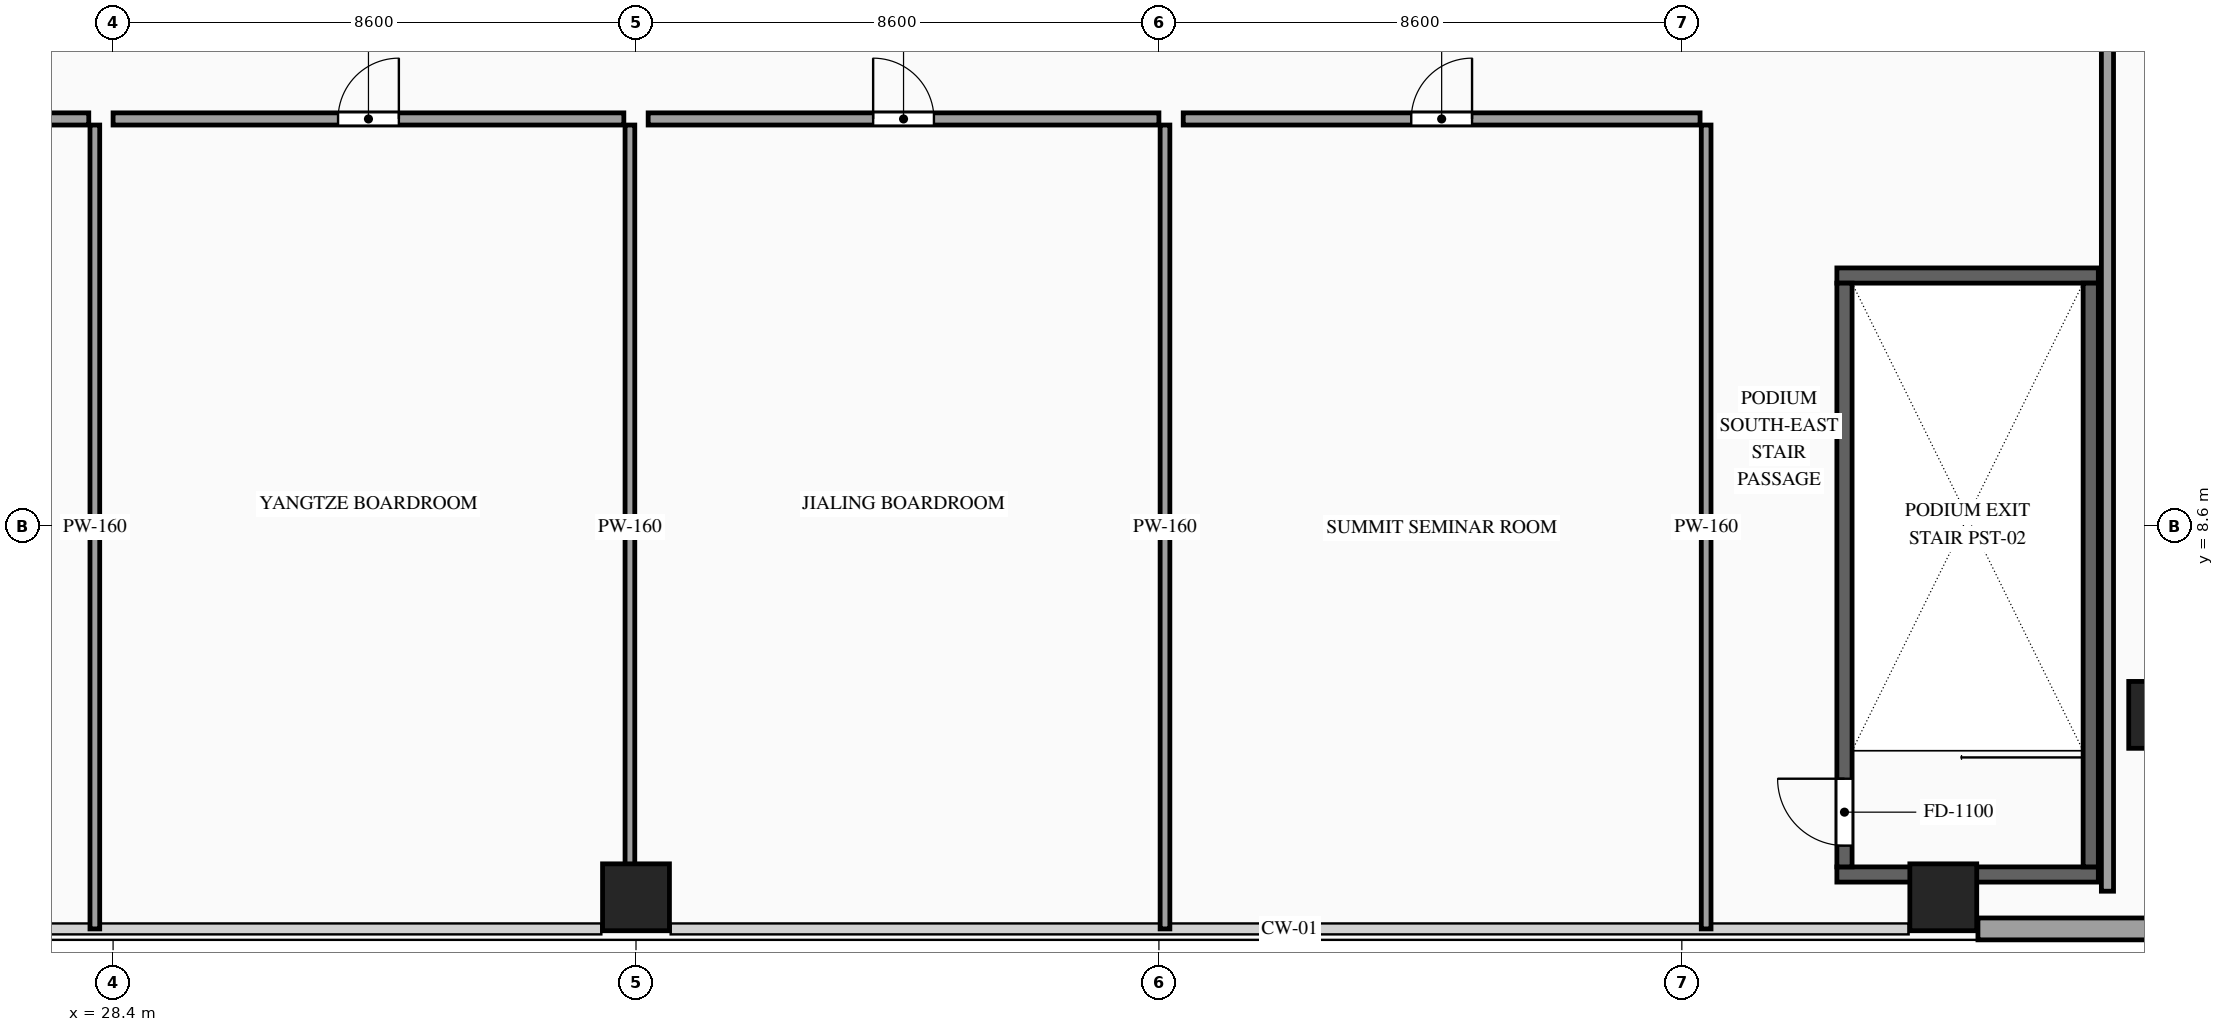
"""IFC4 building model, lengths in metres.
Left out: names, types, materials, properties, quantities, classifications, styles, units other than length and angle.
Written with IfcOpenShell. Run it as: python <this file> out.ifc"""

import sys

from ifc_helpers import new_model, si_unit, direction, frame, frame_2d, origin, origin_2d, place, context, subcontext, project, spatial, rectangle, extrude, source, transform, mapped, element, fill, save


model = new_model("IFC4")
c1 = context("Model", 3, precision=1e-05, world=origin(), true_north=direction((0.0, 1.0)))
c2 = subcontext(c1, "Body", "Model", "MODEL_VIEW")
j1 = project(units=[si_unit("LENGTHUNIT", "METRE"), si_unit("PLANEANGLEUNIT", "RADIAN")], contexts=[c1])
p1 = place(None, origin())
s1 = spatial("IfcSite", under=j1, at=p1, CompositionType="ELEMENT")
p2 = place(p1, origin())
s2 = spatial("IfcBuilding", under=s1, at=p2, CompositionType="ELEMENT")
p3 = place(p2, frame((0.0, 0.0, 25.8)))
s3 = spatial("IfcBuildingStorey", under=s2, at=p3, CompositionType="ELEMENT", Elevation=25.8)
m1 = source(origin(), c2, "Body", "SweptSolid", [
    extrude(rectangle(XDim=1.1, YDim=1.1, at=origin_2d()), origin(), (0.0, 0.0, 1.0), 4.8),
])
for number, where, z_axis, x_axis in (
    (1, (62.1, 5.5, 0.0), (0.0, 0.0, 1.0), (1.0, 0.0, 0.0)),
    (2, (37.0, 2.5, 0.0), (0.0, 0.0, 1.0), (1.0, 0.0, 0.0)),
    (3, (58.5, 2.5, 0.0), (0.0, 0.0, 1.0), (1.0, 0.0, 0.0)),
):
    element("IfcColumn", number, at=place(p3, frame(where, z_axis=z_axis, x_axis=x_axis)), inside=s3, PredefinedType="COLUMN", context=c2, shape_type="MappedRepresentation", body=[
        mapped(m1, transform((0.0, 0.0, 0.0), scale=1.0)),
    ])
p4 = place(p3, frame((59.07, 1.98, 0.0), z_axis=(0.0, 0.0, 1.0), x_axis=(1.0, 0.0, 0.0)))
e4 = element("IfcWall", 4, at=p4, inside=s3, PredefinedType="SOLIDWALL", context=c2, shape_type="SweptSolid", body=[
    extrude(rectangle(XDim=12.93, YDim=0.36, at=frame_2d((6.465, 0.0))), origin(), (0.0, 0.0, 1.0), 4.5),
])
p5 = place(p4, frame((5.73, 0.0, 0.85)))
e5 = element("IfcOpeningElement", 5, at=p5, cuts=e4, PredefinedType="OPENING", context=c2, shape_type="SweptSolid", body=[
    extrude(rectangle(XDim=2.4, YDim=2.4, at=frame_2d((1.2, 1.2))), frame((0.0, 0.195, 0.0), z_axis=(0.0, -1.0, 0.0), x_axis=(1.0, 0.0, 0.0)), (0.0, 0.0, 1.0), 0.39),
])
m2 = source(origin(), c2, "Body", "SweptSolid", [
    extrude(rectangle(XDim=4.3, YDim=0.25, at=frame_2d((2.15, 0.0))), origin(), (0.0, 0.0, 1.0), 4.5),
])
for number, where, z_axis, x_axis in (
    (6, (56.75, 2.875, 0.0), (0.0, 0.0, 1.0), (1.0, 0.0, 0.0)),
    (7, (56.75, 12.725, 0.0), (0.0, 0.0, 1.0), (1.0, 0.0, 0.0)),
):
    element("IfcWall", number, at=place(p3, frame(where, z_axis=z_axis, x_axis=x_axis)), inside=s3, PredefinedType="SOLIDWALL", context=c2, shape_type="MappedRepresentation", body=[
        mapped(m2, transform((0.0, 0.0, 0.0), scale=1.0)),
    ])
p6 = place(p3, frame((56.875, 3.0, 0.0), z_axis=(0.0, 0.0, 1.0), x_axis=(0.0, 1.0, 0.0)))
e8 = element("IfcWall", 8, at=p6, inside=s3, PredefinedType="SOLIDWALL", context=c2, shape_type="SweptSolid", body=[
    extrude(rectangle(XDim=9.6, YDim=0.25, at=frame_2d((4.8, 0.0))), origin(), (0.0, 0.0, 1.0), 4.5),
])
p7 = place(p6, frame((0.35, 0.0, 0.0)))
e9 = element("IfcOpeningElement", 9, at=p7, cuts=e8, PredefinedType="OPENING", context=c2, shape_type="SweptSolid", body=[
    extrude(rectangle(XDim=1.1, YDim=2.2, at=frame_2d((0.55, 1.1))), frame((0.0, 0.14, 0.0), z_axis=(0.0, -1.0, 0.0), x_axis=(1.0, 0.0, 0.0)), (0.0, 0.0, 1.0), 0.28),
])
m3 = source(origin(), c2, "Body", "SweptSolid", [
    extrude(rectangle(XDim=9.6, YDim=0.25, at=frame_2d((4.8, 0.0))), origin(), (0.0, 0.0, 1.0), 4.5),
])
p8 = place(p3, frame((60.925, 3.0, 0.0), z_axis=(0.0, 0.0, 1.0), x_axis=(0.0, 1.0, 0.0)))
e10 = element("IfcWall", 10, at=p8, inside=s3, PredefinedType="SOLIDWALL", context=c2, shape_type="MappedRepresentation", body=[
    mapped(m3, transform((0.0, 0.0, 0.0), scale=1.0)),
])
p9 = place(p3, frame((19.5, 15.3, 0.0), z_axis=(0.0, 0.0, 1.0), x_axis=(1.0, 0.0, 0.0)))
e11 = element("IfcWall", 11, at=p9, inside=s3, PredefinedType="PARTITIONING", context=c2, shape_type="SweptSolid", body=[
    extrude(rectangle(XDim=8.5, YDim=0.2, at=frame_2d((4.25, 0.0))), origin(), (0.0, 0.0, 1.0), 4.5),
])
p10 = place(p9, frame((3.75, 0.0, 0.0)))
e12 = element("IfcOpeningElement", 12, at=p10, cuts=e11, PredefinedType="OPENING", context=c2, shape_type="SweptSolid", body=[
    extrude(rectangle(XDim=1.0, YDim=2.2, at=frame_2d((0.5, 1.1))), frame((0.0, 0.115, 0.0), z_axis=(0.0, -1.0, 0.0), x_axis=(1.0, 0.0, 0.0)), (0.0, 0.0, 1.0), 0.23),
])
m4 = source(origin(), c2, "Body", "SweptSolid", [
    extrude(rectangle(XDim=13.22, YDim=0.16, at=frame_2d((6.61, 0.0))), origin(), (0.0, 0.0, 1.0), 4.5),
])
p11 = place(p3, frame((28.1, 1.98, 0.0), z_axis=(0.0, 0.0, 1.0), x_axis=(0.0, 1.0, 0.0)))
e13 = element("IfcWall", 13, at=p11, inside=s3, PredefinedType="PARTITIONING", context=c2, shape_type="MappedRepresentation", body=[
    mapped(m4, transform((0.0, 0.0, 0.0), scale=1.0)),
])
p12 = place(p3, frame((28.4, 15.3, 0.0), z_axis=(0.0, 0.0, 1.0), x_axis=(1.0, 0.0, 0.0)))
e14 = element("IfcWall", 14, at=p12, inside=s3, PredefinedType="PARTITIONING", context=c2, shape_type="SweptSolid", body=[
    extrude(rectangle(XDim=8.4, YDim=0.2, at=frame_2d((4.2, 0.0))), origin(), (0.0, 0.0, 1.0), 4.5),
])
p13 = place(p12, frame((3.7, 0.0, 0.0)))
e15 = element("IfcOpeningElement", 15, at=p13, cuts=e14, PredefinedType="OPENING", context=c2, shape_type="SweptSolid", body=[
    extrude(rectangle(XDim=1.0, YDim=2.2, at=frame_2d((0.5, 1.1))), frame((0.0, 0.115, 0.0), z_axis=(0.0, -1.0, 0.0), x_axis=(1.0, 0.0, 0.0)), (0.0, 0.0, 1.0), 0.23),
])
m5 = source(origin(), c2, "Body", "SweptSolid", [
    extrude(rectangle(XDim=13.22, YDim=0.16, at=frame_2d((6.61, 0.0))), origin(), (0.0, 0.0, 1.0), 3.095),
])
p14 = place(p3, frame((36.9, 1.98, 0.0), z_axis=(0.0, 0.0, 1.0), x_axis=(0.0, 1.0, 0.0)))
e16 = element("IfcWall", 16, at=p14, inside=s3, PredefinedType="PARTITIONING", context=c2, shape_type="MappedRepresentation", body=[
    mapped(m5, transform((0.0, 0.0, 0.0), scale=1.0)),
])
p15 = place(p3, frame((37.2, 15.3, 0.0), z_axis=(0.0, 0.0, 1.0), x_axis=(1.0, 0.0, 0.0)))
e17 = element("IfcWall", 17, at=p15, inside=s3, PredefinedType="PARTITIONING", context=c2, shape_type="SweptSolid", body=[
    extrude(rectangle(XDim=8.4, YDim=0.2, at=frame_2d((4.2, 0.0))), origin(), (0.0, 0.0, 1.0), 4.5),
])
p16 = place(p15, frame((3.7, 0.0, 0.0)))
e18 = element("IfcOpeningElement", 18, at=p16, cuts=e17, PredefinedType="OPENING", context=c2, shape_type="SweptSolid", body=[
    extrude(rectangle(XDim=1.0, YDim=2.2, at=frame_2d((0.5, 1.1))), frame((0.0, 0.115, 0.0), z_axis=(0.0, -1.0, 0.0), x_axis=(1.0, 0.0, 0.0)), (0.0, 0.0, 1.0), 0.23),
])
p17 = place(p3, frame((45.7, 1.98, 0.0), z_axis=(0.0, 0.0, 1.0), x_axis=(0.0, 1.0, 0.0)))
e19 = element("IfcWall", 19, at=p17, inside=s3, PredefinedType="PARTITIONING", context=c2, shape_type="MappedRepresentation", body=[
    mapped(m4, transform((0.0, 0.0, 0.0), scale=1.0)),
])
p18 = place(p3, frame((46.0, 15.3, 0.0), z_axis=(0.0, 0.0, 1.0), x_axis=(1.0, 0.0, 0.0)))
e20 = element("IfcWall", 20, at=p18, inside=s3, PredefinedType="PARTITIONING", context=c2, shape_type="SweptSolid", body=[
    extrude(rectangle(XDim=8.5, YDim=0.2, at=frame_2d((4.25, 0.0))), origin(), (0.0, 0.0, 1.0), 4.5),
])
p19 = place(p18, frame((3.75, 0.0, 0.0)))
e21 = element("IfcOpeningElement", 21, at=p19, cuts=e20, PredefinedType="OPENING", context=c2, shape_type="SweptSolid", body=[
    extrude(rectangle(XDim=1.0, YDim=2.2, at=frame_2d((0.5, 1.1))), frame((0.0, 0.115, 0.0), z_axis=(0.0, -1.0, 0.0), x_axis=(1.0, 0.0, 0.0)), (0.0, 0.0, 1.0), 0.23),
])
p20 = place(p3, frame((54.6, 1.98, 0.0), z_axis=(0.0, 0.0, 1.0), x_axis=(0.0, 1.0, 0.0)))
e22 = element("IfcWall", 22, at=p20, inside=s3, PredefinedType="PARTITIONING", context=c2, shape_type="MappedRepresentation", body=[
    mapped(m4, transform((0.0, 0.0, 0.0), scale=1.0)),
])
p21 = place(p3, frame((61.2, 2.6, 0.0), z_axis=(0.0, 0.0, 1.0), x_axis=(0.0, 1.0, 0.0)))
e23 = element("IfcWall", 23, at=p21, inside=s3, PredefinedType="PARTITIONING", context=c2, shape_type="SweptSolid", body=[
    extrude(rectangle(XDim=21.8, YDim=0.2, at=frame_2d((10.9, 0.0))), origin(), (0.0, 0.0, 1.0), 4.5),
])
p22 = place(p21, frame((14.9, 0.0, 0.0)))
e24 = element("IfcOpeningElement", 24, at=p22, cuts=e23, PredefinedType="OPENING", context=c2, shape_type="SweptSolid", body=[
    extrude(rectangle(XDim=1.0, YDim=2.2, at=frame_2d((0.5, 1.1))), frame((0.0, 0.115, 0.0), z_axis=(0.0, -1.0, 0.0), x_axis=(1.0, 0.0, 0.0)), (0.0, 0.0, 1.0), 0.23),
])
m6 = source(origin(), c2, "Body", "SweptSolid", [
    extrude(rectangle(XDim=1.1, YDim=2.2, at=frame_2d((0.55, 1.1))), frame((0.0, 0.025, 0.0), z_axis=(0.0, -1.0, 0.0), x_axis=(1.0, 0.0, 0.0)), (0.0, 0.0, 1.0), 0.05),
])
p23 = place(p7, origin())
e25 = element("IfcDoor", 25, at=p23, inside=s3, OperationType="SINGLE_SWING_RIGHT", PredefinedType="DOOR", context=c2, shape_type="MappedRepresentation", body=[
    mapped(m6, transform((0.0, 0.0, 0.0), scale=1.0)),
])
fill(e9, e25)
m7 = source(origin(), c2, "Body", "SweptSolid", [
    extrude(rectangle(XDim=1.0, YDim=2.2, at=frame_2d((0.5, 1.1))), frame((0.0, 0.025, 0.0), z_axis=(0.0, -1.0, 0.0), x_axis=(1.0, 0.0, 0.0)), (0.0, 0.0, 1.0), 0.05),
])
p24 = place(p13, origin())
e26 = element("IfcDoor", 26, at=p24, inside=s3, OperationType="SINGLE_SWING_RIGHT", PredefinedType="DOOR", context=c2, shape_type="MappedRepresentation", body=[
    mapped(m7, transform((0.0, 0.0, 0.0), scale=1.0)),
])
fill(e15, e26)
p25 = place(p16, origin())
e27 = element("IfcDoor", 27, at=p25, inside=s3, OperationType="SINGLE_SWING_LEFT", PredefinedType="DOOR", context=c2, shape_type="MappedRepresentation", body=[
    mapped(m7, transform((0.0, 0.0, 0.0), scale=1.0)),
])
fill(e18, e27)
p26 = place(p19, origin())
e28 = element("IfcDoor", 28, at=p26, inside=s3, OperationType="SINGLE_SWING_RIGHT", PredefinedType="DOOR", context=c2, shape_type="MappedRepresentation", body=[
    mapped(m7, transform((0.0, 0.0, 0.0), scale=1.0)),
])
fill(e21, e28)
save(model, sys.argv[1])
